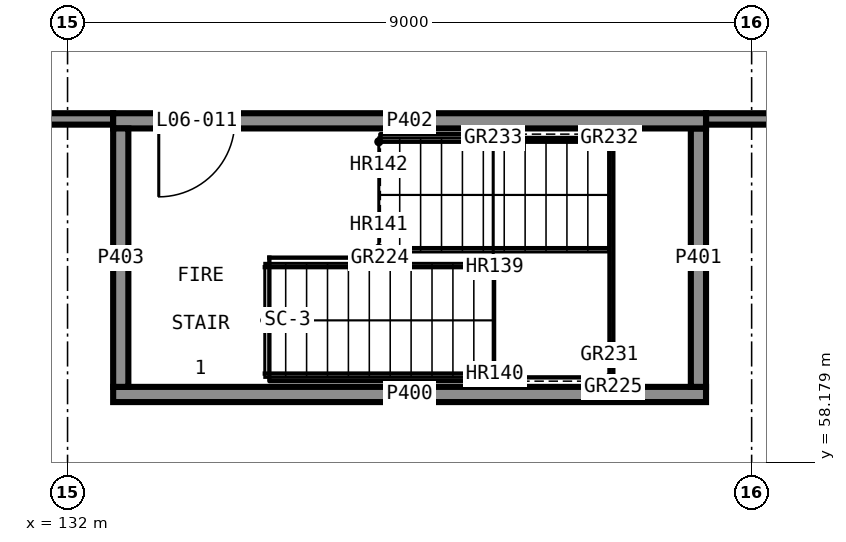
"""IFC4 building model, lengths in metres.
Left out: names, types, materials, properties, quantities, classifications, styles, units other than length and angle.
Written with IfcOpenShell. Run it as: python <this file> out.ifc"""

import sys

from ifc_helpers import new_model, si_unit, direction, frame, frame_2d, origin, place, context, subcontext, project, spatial, rectangle, extrude, element, fill, save


model = new_model("IFC4")
c1 = context("Model", 3, precision=1e-05, world=origin(), true_north=direction((0.0, 1.0)))
c2 = subcontext(c1, "Body", "Model", "MODEL_VIEW")
j1 = project(units=[si_unit("LENGTHUNIT", "METRE"), si_unit("PLANEANGLEUNIT", "RADIAN")], contexts=[c1])
p1 = place(None, origin())
s1 = spatial("IfcSite", under=j1, at=p1, CompositionType="ELEMENT")
p2 = place(p1, origin())
s2 = spatial("IfcBuilding", under=s1, at=p2, CompositionType="ELEMENT")
p3 = place(p2, frame((0.0, 0.0, 25.5)))
s3 = spatial("IfcBuildingStorey", under=s2, at=p3, CompositionType="ELEMENT", Elevation=25.5)
p4 = place(p3, frame((132.6, 59.075, 0.0), z_axis=(0.0, 0.0, 1.0), x_axis=(1.0, 0.0, 0.0)))
e1 = element("IfcWall", 1, at=p4, inside=s3, PredefinedType="SHEAR", context=c2, shape_type="SweptSolid", body=[
    extrude(rectangle(XDim=7.8, YDim=0.2, at=frame_2d((3.9, 0.0))), origin(), (0.0, 0.0, 1.0), 3.58),
])
p5 = place(p3, frame((140.3, 59.175, 0.0), z_axis=(0.0, 0.0, 1.0), x_axis=(0.0, 1.0, 0.0)))
e2 = element("IfcWall", 2, at=p5, inside=s3, PredefinedType="SHEAR", context=c2, shape_type="SweptSolid", body=[
    extrude(rectangle(XDim=3.4, YDim=0.2, at=frame_2d((1.7, 0.0))), origin(), (0.0, 0.0, 1.0), 3.58),
])
p6 = place(p3, frame((140.4, 62.675, 0.0), z_axis=(0.0, 0.0, 1.0), x_axis=(-1.0, 0.0, 0.0)))
e3 = element("IfcWall", 3, at=p6, inside=s3, PredefinedType="SHEAR", context=c2, shape_type="SweptSolid", body=[
    extrude(rectangle(XDim=7.8, YDim=0.2, at=frame_2d((3.9, 0.0))), origin(), (0.0, 0.0, 1.0), 3.58),
])
p7 = place(p6, frame((6.2, 0.0, 0.0)))
e4 = element("IfcOpeningElement", 4, at=p7, cuts=e3, PredefinedType="OPENING", context=c2, shape_type="SweptSolid", body=[
    extrude(rectangle(XDim=1.0, YDim=2.1, at=frame_2d((0.5, 1.05))), frame((0.0, 0.11, 0.0), z_axis=(0.0, -1.0, 0.0), x_axis=(1.0, 0.0, 0.0)), (0.0, 0.0, 1.0), 0.22),
])
p8 = place(p3, frame((132.7, 62.575, 0.0), z_axis=(0.0, 0.0, 1.0), x_axis=(0.0, -1.0, 0.0)))
e5 = element("IfcWall", 5, at=p8, inside=s3, PredefinedType="SHEAR", context=c2, shape_type="SweptSolid", body=[
    extrude(rectangle(XDim=3.4, YDim=0.2, at=frame_2d((1.7, 0.0))), origin(), (0.0, 0.0, 1.0), 3.58),
])
p9 = place(p3, frame((132.6, 62.7, 0.0), z_axis=(0.0, 0.0, 1.0), x_axis=(-1.0, 0.0, 0.0)))
e6 = element("IfcWall", 6, at=p9, inside=s3, PredefinedType="PARTITIONING", context=c2, shape_type="SweptSolid", body=[
    extrude(rectangle(XDim=11.825, YDim=0.15, at=frame_2d((5.913, 0.0))), origin(), (0.0, 0.0, 1.0), 3.58),
])
p10 = place(p9, frame((7.525, 0.0, 0.0)))
e7 = element("IfcOpeningElement", 7, at=p10, cuts=e6, PredefinedType="OPENING", context=c2, shape_type="SweptSolid", body=[
    extrude(rectangle(XDim=1.0, YDim=2.1, at=frame_2d((0.5, 1.05))), frame((0.0, 0.085, 0.0), z_axis=(0.0, -1.0, 0.0), x_axis=(1.0, 0.0, 0.0)), (0.0, 0.0, 1.0), 0.17),
])
p11 = place(p3, frame((143.225, 62.7, 0.0), z_axis=(0.0, 0.0, 1.0), x_axis=(-1.0, 0.0, 0.0)))
e8 = element("IfcWall", 8, at=p11, inside=s3, PredefinedType="PARTITIONING", context=c2, shape_type="SweptSolid", body=[
    extrude(rectangle(XDim=2.825, YDim=0.15, at=frame_2d((1.413, 0.0))), origin(), (0.0, 0.0, 1.0), 3.58),
])
p12 = place(p7, origin())
e9 = element("IfcDoor", 9, at=p12, inside=s3, OperationType="SINGLE_SWING_LEFT", PredefinedType="DOOR", context=c2, shape_type="SweptSolid", body=[
    extrude(rectangle(XDim=1.0, YDim=2.1, at=frame_2d((0.5, 1.05))), frame((0.0, 0.025, 0.0), z_axis=(0.0, -1.0, 0.0), x_axis=(1.0, 0.0, 0.0)), (0.0, 0.0, 1.0), 0.05),
])
fill(e4, e9)
save(model, sys.argv[1])
